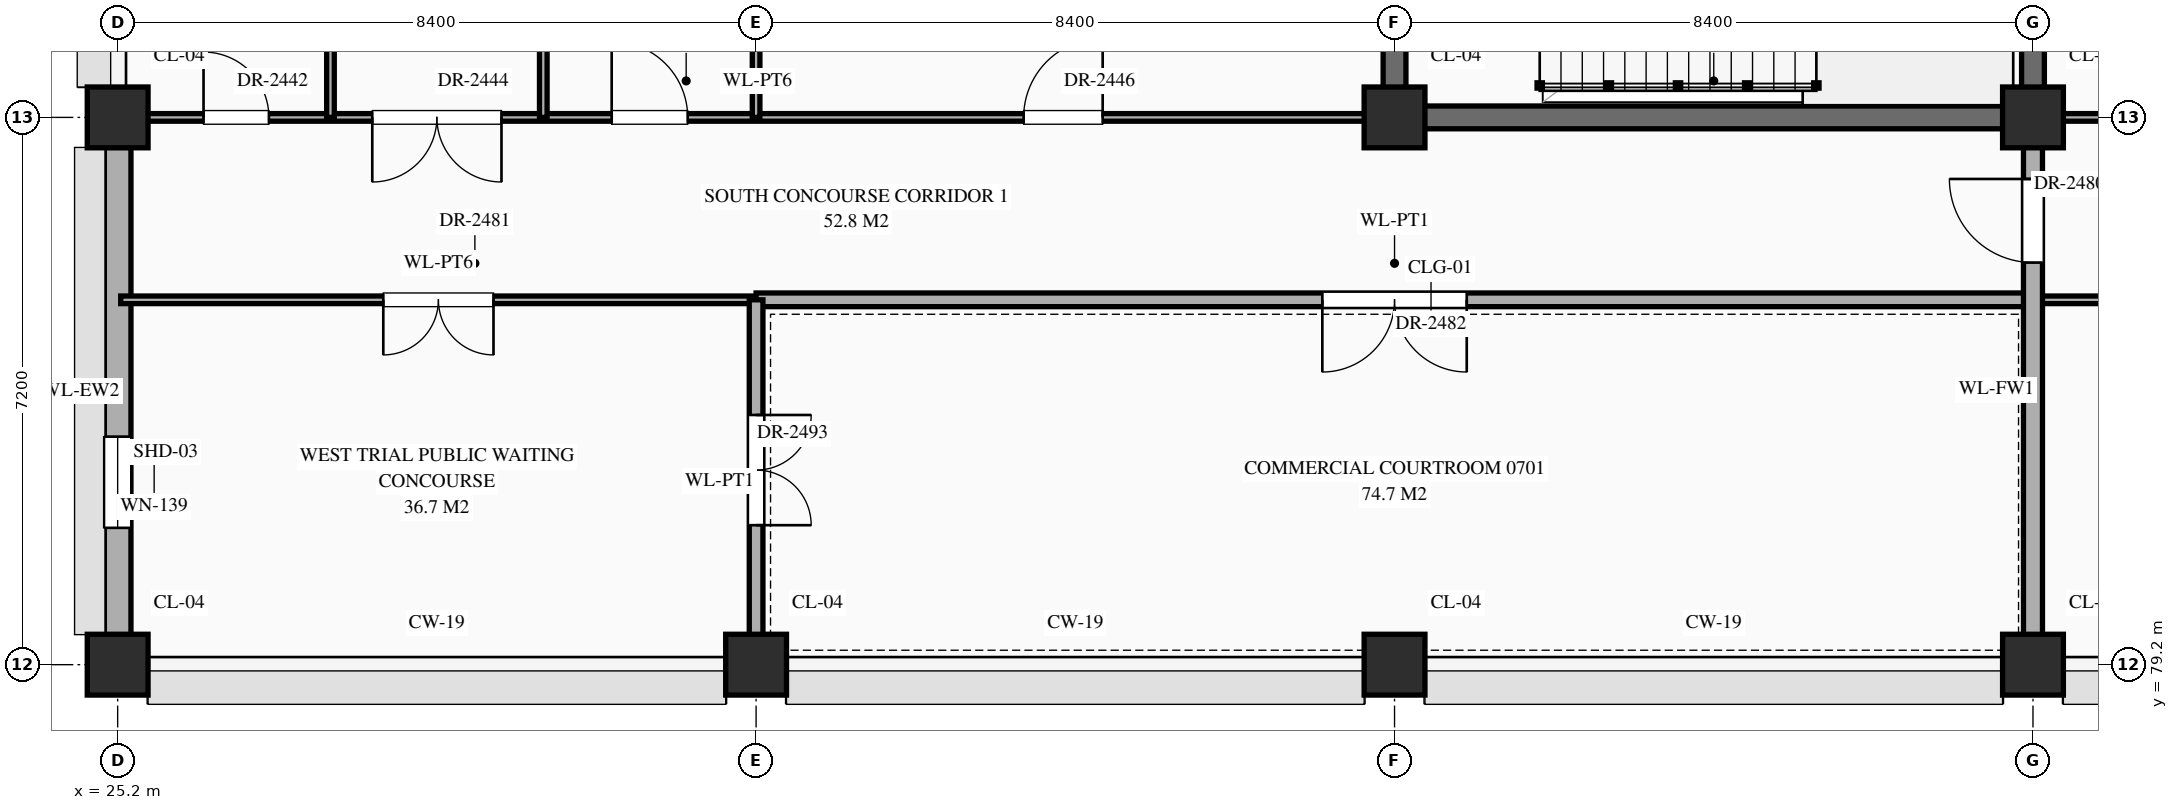
"""IFC4 building model, lengths in metres.
Left out: names, types, materials, properties, quantities, classifications, styles, units other than length and angle.
Written with IfcOpenShell. Run it as: python <this file> out.ifc"""

import sys

from ifc_helpers import new_model, si_unit, direction, frame, frame_2d, origin, origin_2d, place, context, subcontext, project, spatial, rectangle, extrude, element, fill, save


model = new_model("IFC4")
c1 = context("Model", 3, precision=1e-05, world=origin(), true_north=direction((0.0, 1.0)))
c2 = subcontext(c1, "Body", "Model", "MODEL_VIEW")
j1 = project(units=[si_unit("LENGTHUNIT", "METRE"), si_unit("PLANEANGLEUNIT", "RADIAN")], contexts=[c1])
p1 = place(None, origin())
s1 = spatial("IfcSite", under=j1, at=p1, CompositionType="ELEMENT")
p2 = place(p1, origin())
s2 = spatial("IfcBuilding", under=s1, at=p2, CompositionType="ELEMENT")
p3 = place(p2, frame((0.0, 0.0, 30.6)))
s3 = spatial("IfcBuildingStorey", under=s2, at=p3, CompositionType="ELEMENT", Elevation=30.6)
for number, where, z_axis, x_axis in (
    (1, (25.2, 79.2, 0.0), (0.0, 0.0, 1.0), (1.0, 0.0, 0.0)),
    (2, (25.2, 86.4, 0.0), (0.0, 0.0, 1.0), (1.0, 0.0, 0.0)),
    (3, (33.6, 79.2, 0.0), (0.0, 0.0, 1.0), (1.0, 0.0, 0.0)),
    (4, (42.0, 79.2, 0.0), (0.0, 0.0, 1.0), (1.0, 0.0, 0.0)),
    (5, (42.0, 86.4, 0.0), (0.0, 0.0, 1.0), (1.0, 0.0, 0.0)),
    (6, (50.4, 79.2, 0.0), (0.0, 0.0, 1.0), (1.0, 0.0, 0.0)),
    (7, (50.4, 86.4, 0.0), (0.0, 0.0, 1.0), (1.0, 0.0, 0.0)),
):
    element("IfcColumn", number, at=place(p3, frame(where, z_axis=z_axis, x_axis=x_axis)), inside=s3, PredefinedType="COLUMN", context=c2, shape_type="SweptSolid", body=[
        extrude(rectangle(XDim=0.8, YDim=0.8, at=origin_2d()), origin(), (0.0, 0.0, 1.0), 4.5),
    ])
p4 = place(p3, frame((25.2, 79.595, 0.0), z_axis=(0.0, 0.0, 1.0), x_axis=(0.0, 1.0, 0.0)))
e8 = element("IfcWall", 8, at=p4, inside=s3, PredefinedType="STANDARD", context=c2, shape_type="SweptSolid", body=[
    extrude(rectangle(XDim=6.41, YDim=0.35, at=frame_2d((3.205, 0.0))), origin(), (0.0, 0.0, 1.0), 3.65),
])
p5 = place(p4, frame((1.405, 0.0, 0.85)))
e9 = element("IfcOpeningElement", 9, at=p5, cuts=e8, PredefinedType="OPENING", context=c2, shape_type="SweptSolid", body=[
    extrude(rectangle(XDim=1.2, YDim=2.12, at=frame_2d((0.6, 1.06))), frame((0.0, 0.187, 0.0), z_axis=(0.0, -1.0, 0.0), x_axis=(1.0, 0.0, 0.0)), (0.0, 0.0, 1.0), 0.374),
])
p6 = place(p3, frame((25.24, 84.0, 0.0), z_axis=(0.0, 0.0, 1.0), x_axis=(1.0, 0.0, 0.0)))
e10 = element("IfcWall", 10, at=p6, inside=s3, PredefinedType="STANDARD", context=c2, shape_type="SweptSolid", body=[
    extrude(rectangle(XDim=8.36, YDim=0.1, at=frame_2d((4.18, 0.0))), origin(), (0.0, 0.0, 1.0), 4.3),
])
p7 = place(p6, frame((3.455, 0.0, 0.0)))
e11 = element("IfcOpeningElement", 11, at=p7, cuts=e10, PredefinedType="OPENING", context=c2, shape_type="SweptSolid", body=[
    extrude(rectangle(XDim=1.45, YDim=2.3, at=frame_2d((0.725, 1.15))), frame((0.0, 0.062, 0.0), z_axis=(0.0, -1.0, 0.0), x_axis=(1.0, 0.0, 0.0)), (0.0, 0.0, 1.0), 0.124),
])
p8 = place(p3, frame((33.6, 84.0, 0.0), z_axis=(0.0, 0.0, 1.0), x_axis=(1.0, 0.0, 0.0)))
e12 = element("IfcWall", 12, at=p8, inside=s3, PredefinedType="STANDARD", context=c2, shape_type="SweptSolid", body=[
    extrude(rectangle(XDim=16.8, YDim=0.18, at=frame_2d((8.4, 0.0))), origin(), (0.0, 0.0, 1.0), 4.15),
])
p9 = place(p8, frame((7.45, 0.0, 0.0)))
e13 = element("IfcOpeningElement", 13, at=p9, cuts=e12, PredefinedType="OPENING", context=c2, shape_type="SweptSolid", body=[
    extrude(rectangle(XDim=1.9, YDim=2.5, at=frame_2d((0.95, 1.25))), frame((0.0, 0.102, 0.0), z_axis=(0.0, -1.0, 0.0), x_axis=(1.0, 0.0, 0.0)), (0.0, 0.0, 1.0), 0.204),
])
p10 = place(p3, frame((50.4, 84.0, 0.0), z_axis=(0.0, 0.0, 1.0), x_axis=(1.0, 0.0, 0.0)))
e14 = element("IfcWall", 14, at=p10, inside=s3, PredefinedType="STANDARD", context=c2, shape_type="SweptSolid", body=[
    extrude(rectangle(XDim=16.8, YDim=0.1, at=frame_2d((8.4, 0.0))), origin(), (0.0, 0.0, 1.0), 4.24),
])
p11 = place(p10, frame((3.6, 0.0, 0.0)))
e15 = element("IfcOpeningElement", 15, at=p11, cuts=e14, PredefinedType="OPENING", context=c2, shape_type="SweptSolid", body=[
    extrude(rectangle(XDim=1.2, YDim=2.35, at=frame_2d((0.6, 1.175))), frame((0.0, 0.062, 0.0), z_axis=(0.0, -1.0, 0.0), x_axis=(1.0, 0.0, 0.0)), (0.0, 0.0, 1.0), 0.124),
])
p12 = place(p10, frame((11.98, 0.0, 0.0)))
e16 = element("IfcOpeningElement", 16, at=p12, cuts=e14, PredefinedType="OPENING", context=c2, shape_type="SweptSolid", body=[
    extrude(rectangle(XDim=1.24, YDim=2.3, at=frame_2d((0.62, 1.15))), frame((0.0, 0.062, 0.0), z_axis=(0.0, -1.0, 0.0), x_axis=(1.0, 0.0, 0.0)), (0.0, 0.0, 1.0), 0.124),
])
p13 = place(p3, frame((25.24, 86.4, 0.0), z_axis=(0.0, 0.0, 1.0), x_axis=(1.0, 0.0, 0.0)))
e17 = element("IfcWall", 17, at=p13, inside=s3, PredefinedType="STANDARD", context=c2, shape_type="SweptSolid", body=[
    extrude(rectangle(XDim=16.76, YDim=0.1, at=frame_2d((8.38, 0.0))), origin(), (0.0, 0.0, 1.0), 3.1),
])
p14 = place(p13, frame((1.09, 0.0, 0.0)))
e18 = element("IfcOpeningElement", 18, at=p14, cuts=e17, PredefinedType="OPENING", context=c2, shape_type="SweptSolid", body=[
    extrude(rectangle(XDim=0.86, YDim=2.1, at=frame_2d((0.43, 1.05))), frame((0.0, 0.062, 0.0), z_axis=(0.0, -1.0, 0.0), x_axis=(1.0, 0.0, 0.0)), (0.0, 0.0, 1.0), 0.124),
])
p15 = place(p13, frame((3.31, 0.0, 0.0)))
e19 = element("IfcOpeningElement", 19, at=p15, cuts=e17, PredefinedType="OPENING", context=c2, shape_type="SweptSolid", body=[
    extrude(rectangle(XDim=1.7, YDim=2.45, at=frame_2d((0.85, 1.225))), frame((0.0, 0.062, 0.0), z_axis=(0.0, -1.0, 0.0), x_axis=(1.0, 0.0, 0.0)), (0.0, 0.0, 1.0), 0.124),
])
p16 = place(p13, frame((6.46, 0.0, 0.0)))
e20 = element("IfcOpeningElement", 20, at=p16, cuts=e17, PredefinedType="OPENING", context=c2, shape_type="SweptSolid", body=[
    extrude(rectangle(XDim=1.0, YDim=2.25, at=frame_2d((0.5, 1.125))), frame((0.0, 0.062, 0.0), z_axis=(0.0, -1.0, 0.0), x_axis=(1.0, 0.0, 0.0)), (0.0, 0.0, 1.0), 0.124),
])
p17 = place(p13, frame((11.88, 0.0, 0.0)))
e21 = element("IfcOpeningElement", 21, at=p17, cuts=e17, PredefinedType="OPENING", context=c2, shape_type="SweptSolid", body=[
    extrude(rectangle(XDim=1.04, YDim=2.2, at=frame_2d((0.52, 1.1))), frame((0.0, 0.062, 0.0), z_axis=(0.0, -1.0, 0.0), x_axis=(1.0, 0.0, 0.0)), (0.0, 0.0, 1.0), 0.124),
])
p18 = place(p3, frame((42.0, 86.4, 0.0), z_axis=(0.0, 0.0, 1.0), x_axis=(1.0, 0.0, 0.0)))
e22 = element("IfcWall", 22, at=p18, inside=s3, PredefinedType="SHEAR", context=c2, shape_type="SweptSolid", body=[
    extrude(rectangle(XDim=8.4, YDim=0.3, at=frame_2d((4.2, 0.0))), origin(), (0.0, 0.0, 1.0), 4.24),
])
p19 = place(p3, frame((50.4, 86.4, 0.0), z_axis=(0.0, 0.0, 1.0), x_axis=(1.0, 0.0, 0.0)))
e23 = element("IfcWall", 23, at=p19, inside=s3, PredefinedType="STANDARD", context=c2, shape_type="SweptSolid", body=[
    extrude(rectangle(XDim=8.4, YDim=0.1, at=frame_2d((4.2, 0.0))), origin(), (0.0, 0.0, 1.0), 3.39),
])
p20 = place(p19, frame((1.0, 0.0, 0.0)))
e24 = element("IfcOpeningElement", 24, at=p20, cuts=e23, PredefinedType="OPENING", context=c2, shape_type="SweptSolid", body=[
    extrude(rectangle(XDim=1.12, YDim=2.25, at=frame_2d((0.56, 1.125))), frame((0.0, 0.062, 0.0), z_axis=(0.0, -1.0, 0.0), x_axis=(1.0, 0.0, 0.0)), (0.0, 0.0, 1.0), 0.124),
])
p21 = place(p19, frame((3.6, 0.0, 0.0)))
e25 = element("IfcOpeningElement", 25, at=p21, cuts=e23, PredefinedType="OPENING", context=c2, shape_type="SweptSolid", body=[
    extrude(rectangle(XDim=1.2, YDim=2.35, at=frame_2d((0.6, 1.175))), frame((0.0, 0.062, 0.0), z_axis=(0.0, -1.0, 0.0), x_axis=(1.0, 0.0, 0.0)), (0.0, 0.0, 1.0), 0.124),
])
p22 = place(p19, frame((6.22, 0.0, 0.0)))
e26 = element("IfcOpeningElement", 26, at=p22, cuts=e23, PredefinedType="OPENING", context=c2, shape_type="SweptSolid", body=[
    extrude(rectangle(XDim=1.24, YDim=2.3, at=frame_2d((0.62, 1.15))), frame((0.0, 0.062, 0.0), z_axis=(0.0, -1.0, 0.0), x_axis=(1.0, 0.0, 0.0)), (0.0, 0.0, 1.0), 0.124),
])
p23 = place(p3, frame((28.0, 86.4, 0.0), z_axis=(0.0, 0.0, 1.0), x_axis=(0.0, 1.0, 0.0)))
e27 = element("IfcWall", 27, at=p23, inside=s3, PredefinedType="STANDARD", context=c2, shape_type="SweptSolid", body=[
    extrude(rectangle(XDim=7.2, YDim=0.1, at=frame_2d((3.6, 0.0))), origin(), (0.0, 0.0, 1.0), 4.3),
])
p24 = place(p23, frame((3.15, 0.0, 0.0)))
e28 = element("IfcOpeningElement", 28, at=p24, cuts=e27, PredefinedType="OPENING", context=c2, shape_type="SweptSolid", body=[
    extrude(rectangle(XDim=0.9, YDim=2.15, at=frame_2d((0.45, 1.075))), frame((0.0, 0.062, 0.0), z_axis=(0.0, -1.0, 0.0), x_axis=(1.0, 0.0, 0.0)), (0.0, 0.0, 1.0), 0.124),
])
p25 = place(p3, frame((30.8, 86.4, 0.0), z_axis=(0.0, 0.0, 1.0), x_axis=(0.0, 1.0, 0.0)))
e29 = element("IfcWall", 29, at=p25, inside=s3, PredefinedType="STANDARD", context=c2, shape_type="SweptSolid", body=[
    extrude(rectangle(XDim=7.2, YDim=0.1, at=frame_2d((3.6, 0.0))), origin(), (0.0, 0.0, 1.0), 4.3),
])
p26 = place(p25, frame((3.14, 0.0, 0.0)))
e30 = element("IfcOpeningElement", 30, at=p26, cuts=e29, PredefinedType="OPENING", context=c2, shape_type="SweptSolid", body=[
    extrude(rectangle(XDim=0.92, YDim=2.15, at=frame_2d((0.46, 1.075))), frame((0.0, 0.062, 0.0), z_axis=(0.0, -1.0, 0.0), x_axis=(1.0, 0.0, 0.0)), (0.0, 0.0, 1.0), 0.124),
])
p27 = place(p3, frame((33.6, 79.24, 0.0), z_axis=(0.0, 0.0, 1.0), x_axis=(0.0, 1.0, 0.0)))
e31 = element("IfcWall", 31, at=p27, inside=s3, PredefinedType="STANDARD", context=c2, shape_type="SweptSolid", body=[
    extrude(rectangle(XDim=4.76, YDim=0.18, at=frame_2d((2.38, 0.0))), origin(), (0.0, 0.0, 1.0), 4.3),
])
p28 = place(p27, frame((1.795, 0.0, 0.0)))
e32 = element("IfcOpeningElement", 32, at=p28, cuts=e31, PredefinedType="OPENING", context=c2, shape_type="SweptSolid", body=[
    extrude(rectangle(XDim=1.45, YDim=2.3, at=frame_2d((0.725, 1.15))), frame((0.0, 0.102, 0.0), z_axis=(0.0, -1.0, 0.0), x_axis=(1.0, 0.0, 0.0)), (0.0, 0.0, 1.0), 0.204),
])
p29 = place(p3, frame((33.6, 86.4, 0.0), z_axis=(0.0, 0.0, 1.0), x_axis=(0.0, 1.0, 0.0)))
e33 = element("IfcWall", 33, at=p29, inside=s3, PredefinedType="STANDARD", context=c2, shape_type="SweptSolid", body=[
    extrude(rectangle(XDim=7.2, YDim=0.1, at=frame_2d((3.6, 0.0))), origin(), (0.0, 0.0, 1.0), 4.3),
])
p30 = place(p3, frame((42.0, 86.4, 0.0), z_axis=(0.0, 0.0, 1.0), x_axis=(0.0, 1.0, 0.0)))
e34 = element("IfcWall", 34, at=p30, inside=s3, PredefinedType="SHEAR", context=c2, shape_type="SweptSolid", body=[
    extrude(rectangle(XDim=4.8, YDim=0.3, at=frame_2d((2.4, 0.0))), origin(), (0.0, 0.0, 1.0), 4.15),
])
p31 = place(p3, frame((50.4, 79.24, 0.0), z_axis=(0.0, 0.0, 1.0), x_axis=(0.0, 1.0, 0.0)))
e35 = element("IfcWall", 35, at=p31, inside=s3, PredefinedType="STANDARD", context=c2, shape_type="SweptSolid", body=[
    extrude(rectangle(XDim=7.16, YDim=0.25, at=frame_2d((3.58, 0.0))), origin(), (0.0, 0.0, 1.0), 3.49),
])
p32 = place(p31, frame((5.25, 0.0, 0.0)))
e36 = element("IfcOpeningElement", 36, at=p32, cuts=e35, PredefinedType="OPENING", context=c2, shape_type="SweptSolid", body=[
    extrude(rectangle(XDim=1.1, YDim=2.2, at=frame_2d((0.55, 1.1))), frame((0.0, 0.137, 0.0), z_axis=(0.0, -1.0, 0.0), x_axis=(1.0, 0.0, 0.0)), (0.0, 0.0, 1.0), 0.274),
])
p33 = place(p3, frame((50.4, 86.4, 0.0), z_axis=(0.0, 0.0, 1.0), x_axis=(0.0, 1.0, 0.0)))
e37 = element("IfcWall", 37, at=p33, inside=s3, PredefinedType="SHEAR", context=c2, shape_type="SweptSolid", body=[
    extrude(rectangle(XDim=4.8, YDim=0.3, at=frame_2d((2.4, 0.0))), origin(), (0.0, 0.0, 1.0), 4.24),
])
p34 = place(p5, origin())
e38 = element("IfcWindow", 38, at=p34, inside=s3, PartitioningType="SINGLE_PANEL", PredefinedType="WINDOW", context=c2, shape_type="SweptSolid", body=[
    extrude(rectangle(XDim=1.2, YDim=2.12, at=frame_2d((0.6, 1.06))), frame((0.0, 0.03, 0.0), z_axis=(0.0, -1.0, 0.0), x_axis=(1.0, 0.0, 0.0)), (0.0, 0.0, 1.0), 0.06),
])
fill(e9, e38)
p35 = place(p14, origin())
e39 = element("IfcDoor", 39, at=p35, inside=s3, OperationType="SINGLE_SWING_LEFT", PredefinedType="DOOR", context=c2, shape_type="SweptSolid", body=[
    extrude(rectangle(XDim=0.86, YDim=2.1, at=frame_2d((0.43, 1.05))), frame((0.0, 0.025, 0.0), z_axis=(0.0, -1.0, 0.0), x_axis=(1.0, 0.0, 0.0)), (0.0, 0.0, 1.0), 0.05),
])
fill(e18, e39)
p36 = place(p15, frame((1.7, 0.0, 0.0), z_axis=(0.0, 0.0, 1.0), x_axis=(-1.0, 0.0, 0.0)))
e40 = element("IfcDoor", 40, at=p36, inside=s3, OperationType="DOUBLE_DOOR_SINGLE_SWING", PredefinedType="DOOR", context=c2, shape_type="SweptSolid", body=[
    extrude(rectangle(XDim=1.7, YDim=2.45, at=frame_2d((0.85, 1.225))), frame((0.0, 0.025, 0.0), z_axis=(0.0, -1.0, 0.0), x_axis=(1.0, 0.0, 0.0)), (0.0, 0.0, 1.0), 0.05),
])
fill(e19, e40)
p37 = place(p16, origin())
e41 = element("IfcDoor", 41, at=p37, inside=s3, OperationType="SINGLE_SWING_LEFT", PredefinedType="DOOR", context=c2, shape_type="SweptSolid", body=[
    extrude(rectangle(XDim=1.0, YDim=2.25, at=frame_2d((0.5, 1.125))), frame((0.0, 0.025, 0.0), z_axis=(0.0, -1.0, 0.0), x_axis=(1.0, 0.0, 0.0)), (0.0, 0.0, 1.0), 0.05),
])
fill(e20, e41)
p38 = place(p17, origin())
e42 = element("IfcDoor", 42, at=p38, inside=s3, OperationType="SINGLE_SWING_RIGHT", PredefinedType="DOOR", context=c2, shape_type="SweptSolid", body=[
    extrude(rectangle(XDim=1.04, YDim=2.2, at=frame_2d((0.52, 1.1))), frame((0.0, 0.025, 0.0), z_axis=(0.0, -1.0, 0.0), x_axis=(1.0, 0.0, 0.0)), (0.0, 0.0, 1.0), 0.05),
])
fill(e21, e42)
p39 = place(p32, origin())
e43 = element("IfcDoor", 43, at=p39, inside=s3, OperationType="SINGLE_SWING_RIGHT", PredefinedType="DOOR", context=c2, shape_type="SweptSolid", body=[
    extrude(rectangle(XDim=1.1, YDim=2.2, at=frame_2d((0.55, 1.1))), frame((0.0, 0.025, 0.0), z_axis=(0.0, -1.0, 0.0), x_axis=(1.0, 0.0, 0.0)), (0.0, 0.0, 1.0), 0.05),
])
fill(e36, e43)
p40 = place(p7, frame((1.45, 0.0, 0.0), z_axis=(0.0, 0.0, 1.0), x_axis=(-1.0, 0.0, 0.0)))
e44 = element("IfcDoor", 44, at=p40, inside=s3, OperationType="DOUBLE_DOOR_SINGLE_SWING", PredefinedType="DOOR", context=c2, shape_type="SweptSolid", body=[
    extrude(rectangle(XDim=1.45, YDim=2.3, at=frame_2d((0.725, 1.15))), frame((0.0, 0.025, 0.0), z_axis=(0.0, -1.0, 0.0), x_axis=(1.0, 0.0, 0.0)), (0.0, 0.0, 1.0), 0.05),
])
fill(e11, e44)
p41 = place(p9, frame((1.9, 0.0, 0.0), z_axis=(0.0, 0.0, 1.0), x_axis=(-1.0, 0.0, 0.0)))
e45 = element("IfcDoor", 45, at=p41, inside=s3, OperationType="DOUBLE_DOOR_SINGLE_SWING", PredefinedType="DOOR", context=c2, shape_type="SweptSolid", body=[
    extrude(rectangle(XDim=1.9, YDim=2.5, at=frame_2d((0.95, 1.25))), frame((0.0, 0.025, 0.0), z_axis=(0.0, -1.0, 0.0), x_axis=(1.0, 0.0, 0.0)), (0.0, 0.0, 1.0), 0.05),
])
fill(e13, e45)
p42 = place(p28, frame((1.45, 0.0, 0.0), z_axis=(0.0, 0.0, 1.0), x_axis=(-1.0, 0.0, 0.0)))
e46 = element("IfcDoor", 46, at=p42, inside=s3, OperationType="DOUBLE_DOOR_SINGLE_SWING", PredefinedType="DOOR", context=c2, shape_type="SweptSolid", body=[
    extrude(rectangle(XDim=1.45, YDim=2.3, at=frame_2d((0.725, 1.15))), frame((0.0, 0.025, 0.0), z_axis=(0.0, -1.0, 0.0), x_axis=(1.0, 0.0, 0.0)), (0.0, 0.0, 1.0), 0.05),
])
fill(e32, e46)
save(model, sys.argv[1])
